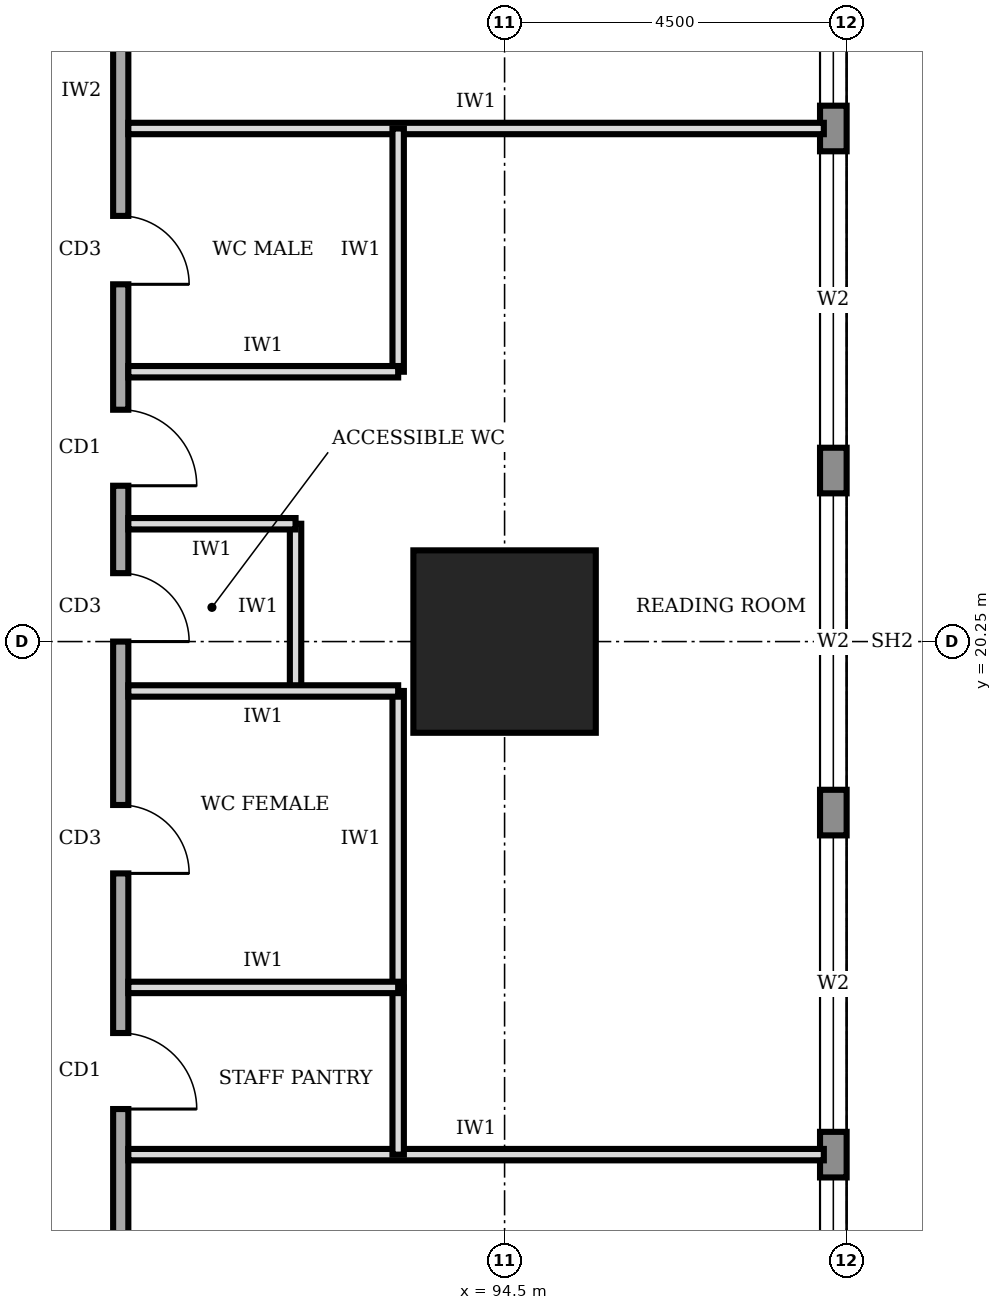
"""IFC4 building model, lengths in metres.
Left out: names, types, materials, properties, quantities, classifications, styles, units other than length and angle.
Written with IfcOpenShell. Run it as: python <this file> out.ifc"""

import sys

from ifc_helpers import new_model, si_unit, direction, frame, frame_2d, origin, origin_2d, place, context, subcontext, project, spatial, rectangle, extrude, element, fill, save


model = new_model("IFC4")
c1 = context("Model", 3, precision=1e-05, world=origin(), true_north=direction((0.0, 1.0)))
c2 = subcontext(c1, "Body", "Model", "MODEL_VIEW")
j1 = project(units=[si_unit("LENGTHUNIT", "METRE"), si_unit("PLANEANGLEUNIT", "RADIAN")], contexts=[c1])
p1 = place(None, origin())
s1 = spatial("IfcSite", under=j1, at=p1, CompositionType="ELEMENT")
p2 = place(p1, origin())
s2 = spatial("IfcBuilding", under=s1, at=p2, CompositionType="ELEMENT")
p3 = place(p2, frame((0.0, 0.0, 53.0)))
s3 = spatial("IfcBuildingStorey", under=s2, at=p3, CompositionType="ELEMENT", Elevation=53.0)
p4 = place(p3, frame((94.5, 20.25, 0.0), z_axis=(0.0, 0.0, 1.0), x_axis=(1.0, 0.0, 0.0)))
e1 = element("IfcColumn", 1, at=p4, inside=s3, PredefinedType="COLUMN", context=c2, shape_type="SweptSolid", body=[
    extrude(rectangle(XDim=2.4, YDim=2.4, at=origin_2d()), origin(), (0.0, 0.0, 1.0), 4.0),
])
p5 = place(p3, frame((98.825, 4.52, 0.0), z_axis=(0.0, 0.0, 1.0), x_axis=(0.0, 1.0, 0.0)))
e2 = element("IfcWall", 2, at=p5, inside=s3, PredefinedType="STANDARD", context=c2, shape_type="SweptSolid", body=[
    extrude(rectangle(XDim=31.46, YDim=0.35, at=frame_2d((15.73, 0.0))), origin(), (0.0, 0.0, 1.0), 3.75),
])
p6 = place(p5, frame((4.78, 0.0, 0.6)))
e3 = element("IfcOpeningElement", 3, at=p6, cuts=e2, PredefinedType="OPENING", context=c2, shape_type="SweptSolid", body=[
    extrude(rectangle(XDim=3.9, YDim=2.6, at=frame_2d((1.95, 1.3))), frame((0.0, 0.185, 0.0), z_axis=(0.0, -1.0, 0.0), x_axis=(1.0, 0.0, 0.0)), (0.0, 0.0, 1.0), 0.37),
])
p7 = place(p5, frame((9.28, 0.0, 0.6)))
e4 = element("IfcOpeningElement", 4, at=p7, cuts=e2, PredefinedType="OPENING", context=c2, shape_type="SweptSolid", body=[
    extrude(rectangle(XDim=3.9, YDim=2.6, at=frame_2d((1.95, 1.3))), frame((0.0, 0.185, 0.0), z_axis=(0.0, -1.0, 0.0), x_axis=(1.0, 0.0, 0.0)), (0.0, 0.0, 1.0), 0.37),
])
p8 = place(p5, frame((13.78, 0.0, 0.6)))
e5 = element("IfcOpeningElement", 5, at=p8, cuts=e2, PredefinedType="OPENING", context=c2, shape_type="SweptSolid", body=[
    extrude(rectangle(XDim=3.9, YDim=2.6, at=frame_2d((1.95, 1.3))), frame((0.0, 0.185, 0.0), z_axis=(0.0, -1.0, 0.0), x_axis=(1.0, 0.0, 0.0)), (0.0, 0.0, 1.0), 0.37),
])
p9 = place(p5, frame((18.28, 0.0, 0.6)))
e6 = element("IfcOpeningElement", 6, at=p9, cuts=e2, PredefinedType="OPENING", context=c2, shape_type="SweptSolid", body=[
    extrude(rectangle(XDim=3.9, YDim=2.6, at=frame_2d((1.95, 1.3))), frame((0.0, 0.185, 0.0), z_axis=(0.0, -1.0, 0.0), x_axis=(1.0, 0.0, 0.0)), (0.0, 0.0, 1.0), 0.37),
])
p10 = place(p5, frame((22.78, 0.0, 0.6)))
e7 = element("IfcOpeningElement", 7, at=p10, cuts=e2, PredefinedType="OPENING", context=c2, shape_type="SweptSolid", body=[
    extrude(rectangle(XDim=3.9, YDim=2.6, at=frame_2d((1.95, 1.3))), frame((0.0, 0.185, 0.0), z_axis=(0.0, -1.0, 0.0), x_axis=(1.0, 0.0, 0.0)), (0.0, 0.0, 1.0), 0.37),
])
p11 = place(p5, frame((27.21, 0.0, 0.6)))
e8 = element("IfcOpeningElement", 8, at=p11, cuts=e2, PredefinedType="OPENING", context=c2, shape_type="SweptSolid", body=[
    extrude(rectangle(XDim=3.9, YDim=2.6, at=frame_2d((1.95, 1.3))), frame((0.0, 0.185, 0.0), z_axis=(0.0, -1.0, 0.0), x_axis=(1.0, 0.0, 0.0)), (0.0, 0.0, 1.0), 0.37),
])
p12 = place(p3, frame((89.45, 9.2, 0.0), z_axis=(0.0, 0.0, 1.0), x_axis=(0.0, 1.0, 0.0)))
e9 = element("IfcWall", 9, at=p12, inside=s3, PredefinedType="SOLIDWALL", context=c2, shape_type="SweptSolid", body=[
    extrude(rectangle(XDim=23.05, YDim=0.2, at=frame_2d((11.525, 0.0))), origin(), (0.0, 0.0, 1.0), 3.75),
])
p13 = place(p12, frame((1.55, 0.0, 0.0)))
e10 = element("IfcOpeningElement", 10, at=p13, cuts=e9, PredefinedType="OPENING", context=c2, shape_type="SweptSolid", body=[
    extrude(rectangle(XDim=1.0, YDim=2.1, at=frame_2d((0.5, 1.05))), frame((0.0, 0.11, 0.0), z_axis=(0.0, -1.0, 0.0), x_axis=(1.0, 0.0, 0.0)), (0.0, 0.0, 1.0), 0.22),
])
p14 = place(p12, frame((4.9, 0.0, 0.0)))
e11 = element("IfcOpeningElement", 11, at=p14, cuts=e9, PredefinedType="OPENING", context=c2, shape_type="SweptSolid", body=[
    extrude(rectangle(XDim=1.0, YDim=2.1, at=frame_2d((0.5, 1.05))), frame((0.0, 0.11, 0.0), z_axis=(0.0, -1.0, 0.0), x_axis=(1.0, 0.0, 0.0)), (0.0, 0.0, 1.0), 0.22),
])
p15 = place(p12, frame((8.0, 0.0, 0.0)))
e12 = element("IfcOpeningElement", 12, at=p15, cuts=e9, PredefinedType="OPENING", context=c2, shape_type="SweptSolid", body=[
    extrude(rectangle(XDim=0.9, YDim=2.1, at=frame_2d((0.45, 1.05))), frame((0.0, 0.11, 0.0), z_axis=(0.0, -1.0, 0.0), x_axis=(1.0, 0.0, 0.0)), (0.0, 0.0, 1.0), 0.22),
])
p16 = place(p12, frame((11.05, 0.0, 0.0)))
e13 = element("IfcOpeningElement", 13, at=p16, cuts=e9, PredefinedType="OPENING", context=c2, shape_type="SweptSolid", body=[
    extrude(rectangle(XDim=0.9, YDim=2.1, at=frame_2d((0.45, 1.05))), frame((0.0, 0.11, 0.0), z_axis=(0.0, -1.0, 0.0), x_axis=(1.0, 0.0, 0.0)), (0.0, 0.0, 1.0), 0.22),
])
p17 = place(p12, frame((15.75, 0.0, 0.0)))
e14 = element("IfcOpeningElement", 14, at=p17, cuts=e9, PredefinedType="OPENING", context=c2, shape_type="SweptSolid", body=[
    extrude(rectangle(XDim=0.9, YDim=2.1, at=frame_2d((0.45, 1.05))), frame((0.0, 0.11, 0.0), z_axis=(0.0, -1.0, 0.0), x_axis=(1.0, 0.0, 0.0)), (0.0, 0.0, 1.0), 0.22),
])
p18 = place(p12, frame((13.1, 0.0, 0.0)))
e15 = element("IfcOpeningElement", 15, at=p18, cuts=e9, PredefinedType="OPENING", context=c2, shape_type="SweptSolid", body=[
    extrude(rectangle(XDim=1.0, YDim=2.1, at=frame_2d((0.5, 1.05))), frame((0.0, 0.11, 0.0), z_axis=(0.0, -1.0, 0.0), x_axis=(1.0, 0.0, 0.0)), (0.0, 0.0, 1.0), 0.22),
])
p19 = place(p12, frame((19.925, 0.0, 0.0)))
e16 = element("IfcOpeningElement", 16, at=p19, cuts=e9, PredefinedType="OPENING", context=c2, shape_type="SweptSolid", body=[
    extrude(rectangle(XDim=1.0, YDim=2.1, at=frame_2d((0.5, 1.05))), frame((0.0, 0.11, 0.0), z_axis=(0.0, -1.0, 0.0), x_axis=(1.0, 0.0, 0.0)), (0.0, 0.0, 1.0), 0.22),
])
for number, where, z_axis, x_axis in (
    (17, (89.55, 13.5, 0.0), (0.0, 0.0, 1.0), (1.0, 0.0, 0.0)),
    (18, (89.55, 27.0, 0.0), (0.0, 0.0, 1.0), (1.0, 0.0, 0.0)),
):
    element("IfcWall", number, at=place(p3, frame(where, z_axis=z_axis, x_axis=x_axis)), inside=s3, PredefinedType="PARTITIONING", context=c2, shape_type="SweptSolid", body=[
        extrude(rectangle(XDim=9.15, YDim=0.15, at=frame_2d((4.575, 0.0))), origin(), (0.0, 0.0, 1.0), 3.75),
    ])
p20 = place(p3, frame((89.55, 15.7, 0.0), z_axis=(0.0, 0.0, 1.0), x_axis=(1.0, 0.0, 0.0)))
e19 = element("IfcWall", 19, at=p20, inside=s3, PredefinedType="PARTITIONING", context=c2, shape_type="SweptSolid", body=[
    extrude(rectangle(XDim=3.55, YDim=0.15, at=frame_2d((1.775, 0.0))), origin(), (0.0, 0.0, 1.0), 3.75),
])
p21 = place(p3, frame((89.55, 19.6, 0.0), z_axis=(0.0, 0.0, 1.0), x_axis=(1.0, 0.0, 0.0)))
e20 = element("IfcWall", 20, at=p21, inside=s3, PredefinedType="PARTITIONING", context=c2, shape_type="SweptSolid", body=[
    extrude(rectangle(XDim=3.55, YDim=0.15, at=frame_2d((1.775, 0.0))), origin(), (0.0, 0.0, 1.0), 2.85),
])
p22 = place(p3, frame((89.55, 21.8, 0.0), z_axis=(0.0, 0.0, 1.0), x_axis=(1.0, 0.0, 0.0)))
e21 = element("IfcWall", 21, at=p22, inside=s3, PredefinedType="PARTITIONING", context=c2, shape_type="SweptSolid", body=[
    extrude(rectangle(XDim=2.2, YDim=0.15, at=frame_2d((1.1, 0.0))), origin(), (0.0, 0.0, 1.0), 3.75),
])
p23 = place(p3, frame((89.55, 23.8, 0.0), z_axis=(0.0, 0.0, 1.0), x_axis=(1.0, 0.0, 0.0)))
e22 = element("IfcWall", 22, at=p23, inside=s3, PredefinedType="PARTITIONING", context=c2, shape_type="SweptSolid", body=[
    extrude(rectangle(XDim=3.55, YDim=0.15, at=frame_2d((1.775, 0.0))), origin(), (0.0, 0.0, 1.0), 3.75),
])
p24 = place(p3, frame((93.1, 13.5, 0.0), z_axis=(0.0, 0.0, 1.0), x_axis=(0.0, 1.0, 0.0)))
e23 = element("IfcWall", 23, at=p24, inside=s3, PredefinedType="PARTITIONING", context=c2, shape_type="SweptSolid", body=[
    extrude(rectangle(XDim=2.2, YDim=0.15, at=frame_2d((1.1, 0.0))), origin(), (0.0, 0.0, 1.0), 3.75),
])
p25 = place(p3, frame((93.1, 15.7, 0.0), z_axis=(0.0, 0.0, 1.0), x_axis=(0.0, 1.0, 0.0)))
e24 = element("IfcWall", 24, at=p25, inside=s3, PredefinedType="PARTITIONING", context=c2, shape_type="SweptSolid", body=[
    extrude(rectangle(XDim=3.9, YDim=0.15, at=frame_2d((1.95, 0.0))), origin(), (0.0, 0.0, 1.0), 3.75),
])
p26 = place(p3, frame((91.75, 19.6, 0.0), z_axis=(0.0, 0.0, 1.0), x_axis=(0.0, 1.0, 0.0)))
e25 = element("IfcWall", 25, at=p26, inside=s3, PredefinedType="PARTITIONING", context=c2, shape_type="SweptSolid", body=[
    extrude(rectangle(XDim=2.2, YDim=0.15, at=frame_2d((1.1, 0.0))), origin(), (0.0, 0.0, 1.0), 3.75),
])
p27 = place(p3, frame((93.1, 23.8, 0.0), z_axis=(0.0, 0.0, 1.0), x_axis=(0.0, 1.0, 0.0)))
e26 = element("IfcWall", 26, at=p27, inside=s3, PredefinedType="PARTITIONING", context=c2, shape_type="SweptSolid", body=[
    extrude(rectangle(XDim=3.2, YDim=0.15, at=frame_2d((1.6, 0.0))), origin(), (0.0, 0.0, 1.0), 3.75),
])
p28 = place(p6, origin())
e27 = element("IfcWindow", 27, at=p28, inside=s3, PartitioningType="SINGLE_PANEL", PredefinedType="WINDOW", context=c2, shape_type="SweptSolid", body=[
    extrude(rectangle(XDim=3.9, YDim=2.6, at=frame_2d((1.95, 1.3))), frame((0.0, 0.03, 0.0), z_axis=(0.0, -1.0, 0.0), x_axis=(1.0, 0.0, 0.0)), (0.0, 0.0, 1.0), 0.06),
])
fill(e3, e27)
p29 = place(p7, origin())
e28 = element("IfcWindow", 28, at=p29, inside=s3, PartitioningType="SINGLE_PANEL", PredefinedType="WINDOW", context=c2, shape_type="SweptSolid", body=[
    extrude(rectangle(XDim=3.9, YDim=2.6, at=frame_2d((1.95, 1.3))), frame((0.0, 0.03, 0.0), z_axis=(0.0, -1.0, 0.0), x_axis=(1.0, 0.0, 0.0)), (0.0, 0.0, 1.0), 0.06),
])
fill(e4, e28)
p30 = place(p8, origin())
e29 = element("IfcWindow", 29, at=p30, inside=s3, PartitioningType="SINGLE_PANEL", PredefinedType="WINDOW", context=c2, shape_type="SweptSolid", body=[
    extrude(rectangle(XDim=3.9, YDim=2.6, at=frame_2d((1.95, 1.3))), frame((0.0, 0.03, 0.0), z_axis=(0.0, -1.0, 0.0), x_axis=(1.0, 0.0, 0.0)), (0.0, 0.0, 1.0), 0.06),
])
fill(e5, e29)
p31 = place(p9, origin())
e30 = element("IfcWindow", 30, at=p31, inside=s3, PartitioningType="SINGLE_PANEL", PredefinedType="WINDOW", context=c2, shape_type="SweptSolid", body=[
    extrude(rectangle(XDim=3.9, YDim=2.6, at=frame_2d((1.95, 1.3))), frame((0.0, 0.03, 0.0), z_axis=(0.0, -1.0, 0.0), x_axis=(1.0, 0.0, 0.0)), (0.0, 0.0, 1.0), 0.06),
])
fill(e6, e30)
p32 = place(p10, origin())
e31 = element("IfcWindow", 31, at=p32, inside=s3, PartitioningType="SINGLE_PANEL", PredefinedType="WINDOW", context=c2, shape_type="SweptSolid", body=[
    extrude(rectangle(XDim=3.9, YDim=2.6, at=frame_2d((1.95, 1.3))), frame((0.0, 0.03, 0.0), z_axis=(0.0, -1.0, 0.0), x_axis=(1.0, 0.0, 0.0)), (0.0, 0.0, 1.0), 0.06),
])
fill(e7, e31)
p33 = place(p14, frame((1.0, 0.0, 0.0), z_axis=(0.0, 0.0, 1.0), x_axis=(-1.0, 0.0, 0.0)))
e32 = element("IfcDoor", 32, at=p33, inside=s3, OperationType="SINGLE_SWING_RIGHT", PredefinedType="DOOR", context=c2, shape_type="SweptSolid", body=[
    extrude(rectangle(XDim=1.0, YDim=2.1, at=frame_2d((0.5, 1.05))), frame((0.0, 0.025, 0.0), z_axis=(0.0, -1.0, 0.0), x_axis=(1.0, 0.0, 0.0)), (0.0, 0.0, 1.0), 0.05),
])
fill(e11, e32)
p34 = place(p15, frame((0.9, 0.0, 0.0), z_axis=(0.0, 0.0, 1.0), x_axis=(-1.0, 0.0, 0.0)))
e33 = element("IfcDoor", 33, at=p34, inside=s3, OperationType="SINGLE_SWING_RIGHT", PredefinedType="DOOR", context=c2, shape_type="SweptSolid", body=[
    extrude(rectangle(XDim=0.9, YDim=2.1, at=frame_2d((0.45, 1.05))), frame((0.0, 0.025, 0.0), z_axis=(0.0, -1.0, 0.0), x_axis=(1.0, 0.0, 0.0)), (0.0, 0.0, 1.0), 0.05),
])
fill(e12, e33)
p35 = place(p16, frame((0.9, 0.0, 0.0), z_axis=(0.0, 0.0, 1.0), x_axis=(-1.0, 0.0, 0.0)))
e34 = element("IfcDoor", 34, at=p35, inside=s3, OperationType="SINGLE_SWING_RIGHT", PredefinedType="DOOR", context=c2, shape_type="SweptSolid", body=[
    extrude(rectangle(XDim=0.9, YDim=2.1, at=frame_2d((0.45, 1.05))), frame((0.0, 0.025, 0.0), z_axis=(0.0, -1.0, 0.0), x_axis=(1.0, 0.0, 0.0)), (0.0, 0.0, 1.0), 0.05),
])
fill(e13, e34)
p36 = place(p17, frame((0.9, 0.0, 0.0), z_axis=(0.0, 0.0, 1.0), x_axis=(-1.0, 0.0, 0.0)))
e35 = element("IfcDoor", 35, at=p36, inside=s3, OperationType="SINGLE_SWING_RIGHT", PredefinedType="DOOR", context=c2, shape_type="SweptSolid", body=[
    extrude(rectangle(XDim=0.9, YDim=2.1, at=frame_2d((0.45, 1.05))), frame((0.0, 0.025, 0.0), z_axis=(0.0, -1.0, 0.0), x_axis=(1.0, 0.0, 0.0)), (0.0, 0.0, 1.0), 0.05),
])
fill(e14, e35)
p37 = place(p18, frame((1.0, 0.0, 0.0), z_axis=(0.0, 0.0, 1.0), x_axis=(-1.0, 0.0, 0.0)))
e36 = element("IfcDoor", 36, at=p37, inside=s3, OperationType="SINGLE_SWING_RIGHT", PredefinedType="DOOR", context=c2, shape_type="SweptSolid", body=[
    extrude(rectangle(XDim=1.0, YDim=2.1, at=frame_2d((0.5, 1.05))), frame((0.0, 0.025, 0.0), z_axis=(0.0, -1.0, 0.0), x_axis=(1.0, 0.0, 0.0)), (0.0, 0.0, 1.0), 0.05),
])
fill(e15, e36)
save(model, sys.argv[1])
